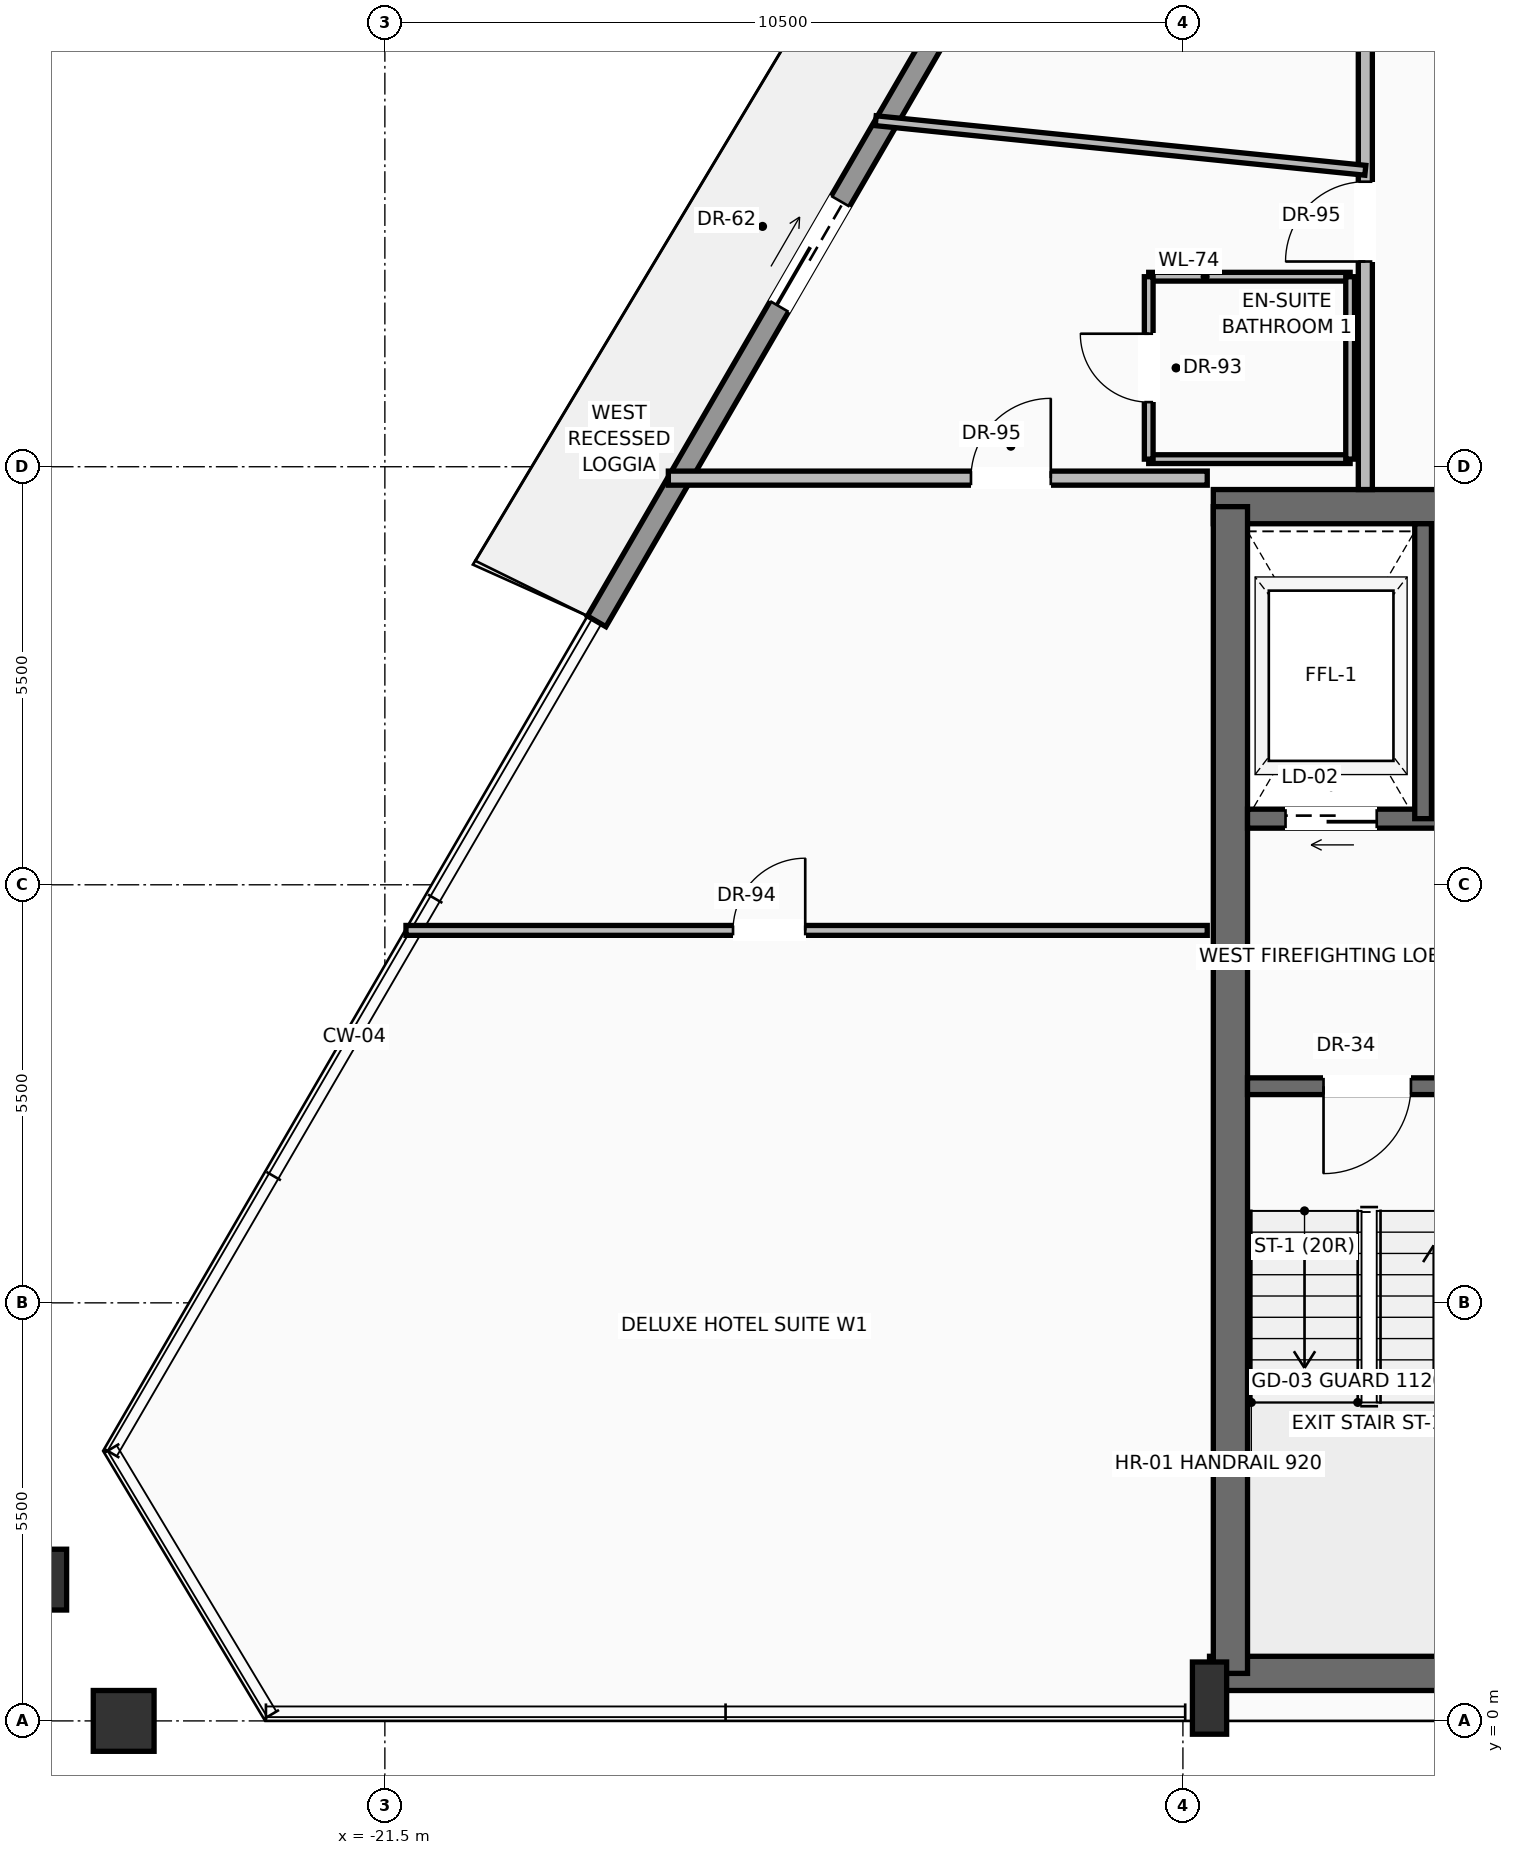
"""IFC4 building model, lengths in metres.
Left out: names, types, materials, properties, quantities, classifications, styles, units other than length and angle.
Written with IfcOpenShell. Run it as: python <this file> out.ifc"""

import sys

from ifc_helpers import new_model, si_unit, direction, frame, frame_2d, origin, origin_2d, place, context, subcontext, project, spatial, rectangle, hollow_rectangle, extrude, source, transform, mapped, element, fill, save


model = new_model("IFC4")
c1 = context("Model", 3, precision=1e-05, world=origin(), true_north=direction((0.0, 1.0)))
c2 = subcontext(c1, "Body", "Model", "MODEL_VIEW")
j1 = project(units=[si_unit("LENGTHUNIT", "METRE"), si_unit("PLANEANGLEUNIT", "RADIAN")], contexts=[c1])
p1 = place(None, origin())
s1 = spatial("IfcSite", under=j1, at=p1, CompositionType="ELEMENT")
p2 = place(p1, origin())
s2 = spatial("IfcBuilding", under=s1, at=p2, CompositionType="ELEMENT")
p3 = place(p2, frame((0.0, 0.0, 266.1)))
s3 = spatial("IfcBuildingStorey", under=s2, at=p3, CompositionType="ELEMENT", Elevation=266.1)
p4 = place(p3, frame((-10.65, 0.625, 0.0), z_axis=(0.0, 0.0, 1.0), x_axis=(1.0, 0.0, 0.0)))
e1 = element("IfcWall", 1, at=p4, inside=s3, PredefinedType="SHEAR", context=c2, shape_type="SweptSolid", body=[
    extrude(rectangle(XDim=21.3, YDim=0.45, at=frame_2d((10.65, 0.0))), origin(), (0.0, 0.0, 1.0), 3.24),
])
p5 = place(p3, frame((-10.6, 15.975, 0.0), z_axis=(0.0, 0.0, 1.0), x_axis=(1.0, 0.0, 0.0)))
e2 = element("IfcWall", 2, at=p5, inside=s3, PredefinedType="SHEAR", context=c2, shape_type="SweptSolid", body=[
    extrude(rectangle(XDim=21.2, YDim=0.45, at=frame_2d((10.6, 0.0))), origin(), (0.0, 0.0, 1.0), 3.24),
])
p6 = place(p5, frame((3.17, 0.0, 0.0)))
e3 = element("IfcOpeningElement", 3, at=p6, cuts=e2, PredefinedType="OPENING", context=c2, shape_type="SweptSolid", body=[
    extrude(rectangle(XDim=1.3, YDim=2.3, at=frame_2d((0.65, 1.15))), frame((0.0, 0.235, 0.0), z_axis=(0.0, -1.0, 0.0), x_axis=(1.0, 0.0, 0.0)), (0.0, 0.0, 1.0), 0.47),
])
p7 = place(p5, frame((9.6, 0.0, 0.0)))
e4 = element("IfcOpeningElement", 4, at=p7, cuts=e2, PredefinedType="OPENING", context=c2, shape_type="SweptSolid", body=[
    extrude(rectangle(XDim=2.0, YDim=2.4, at=frame_2d((1.0, 1.2))), frame((0.0, 0.235, 0.0), z_axis=(0.0, -1.0, 0.0), x_axis=(1.0, 0.0, 0.0)), (0.0, 0.0, 1.0), 0.47),
])
p8 = place(p3, frame((-10.375, 0.625, 0.0), z_axis=(0.0, 0.0, 1.0), x_axis=(0.0, 1.0, 0.0)))
e5 = element("IfcWall", 5, at=p8, inside=s3, PredefinedType="SHEAR", context=c2, shape_type="SweptSolid", body=[
    extrude(rectangle(XDim=15.35, YDim=0.45, at=frame_2d((7.675, 0.0))), origin(), (0.0, 0.0, 1.0), 3.24),
])
m1 = source(origin(), c2, "Body", "SweptSolid", [
    extrude(rectangle(XDim=0.45, YDim=0.95, at=origin_2d()), origin(), (0.0, 0.0, 1.0), 3.45),
])
p9 = place(p3, frame((-10.65, 0.3, 0.0), z_axis=(0.0, 0.0, 1.0), x_axis=(1.0, 0.0, 0.0)))
e6 = element("IfcColumn", 6, at=p9, inside=s3, PredefinedType="PILASTER", context=c2, shape_type="MappedRepresentation", body=[
    mapped(m1, transform((0.0, 0.0, 0.0), scale=1.0)),
])
m2 = source(origin(), c2, "Body", "SweptSolid", [
    extrude(hollow_rectangle(XDim=0.8, YDim=0.8, WallThickness=0.04, at=origin_2d()), origin(), (0.0, 0.0, 1.0), 3.441),
])
p10 = place(p3, frame((-24.937, 0.0, 0.004), z_axis=(7.0947144e-05, 0.0, 0.999999997483), x_axis=(1.0, 0.0, 0.0)))
e7 = element("IfcColumn", 7, at=p10, inside=s3, PredefinedType="COLUMN", context=c2, shape_type="MappedRepresentation", body=[
    mapped(m2, transform((0.0, 0.0, 0.0), scale=1.0)),
])
m3 = source(origin(), c2, "Body", "SweptSolid", [
    extrude(hollow_rectangle(XDim=0.8, YDim=0.8, WallThickness=0.04, at=origin_2d()), origin(), (0.0, 0.0, 1.0), 3.442),
])
p11 = place(p3, frame((-26.087, 1.859, 0.004), z_axis=(0.011632927657, -0.016669134143, 0.999793386136), x_axis=(0.820050783097, 0.572290759267, 0.0)))
e8 = element("IfcColumn", 8, at=p11, inside=s3, PredefinedType="COLUMN", context=c2, shape_type="MappedRepresentation", body=[
    mapped(m3, transform((0.0, 0.0, 0.0), scale=1.0)),
])
p12 = place(p3, frame((-18.713, 14.466, 0.0), z_axis=(0.0, 0.0, 1.0), x_axis=(0.501837095331, 0.864962155097, 0.0)))
e9 = element("IfcWall", 9, at=p12, inside=s3, PredefinedType="SOLIDWALL", context=c2, shape_type="SweptSolid", body=[
    extrude(rectangle(XDim=19.956, YDim=0.28, at=frame_2d((9.978, 0.0))), origin(), (0.0, 0.0, 1.0), 2.82),
])
p13 = place(p12, frame((4.789, 0.0, 0.0)))
e10 = element("IfcOpeningElement", 10, at=p13, cuts=e9, PredefinedType="OPENING", context=c2, shape_type="SweptSolid", body=[
    extrude(rectangle(XDim=1.6, YDim=2.35, at=frame_2d((0.8, 1.175))), frame((0.0, 0.15, 0.0), z_axis=(0.0, -1.0, 0.0), x_axis=(1.0, 0.0, 0.0)), (0.0, 0.0, 1.0), 0.3),
])
p14 = place(p12, frame((13.57, 0.0, 0.9)))
e11 = element("IfcOpeningElement", 11, at=p14, cuts=e9, PredefinedType="OPENING", context=c2, shape_type="SweptSolid", body=[
    extrude(rectangle(XDim=1.55, YDim=1.75, at=frame_2d((0.775, 0.875))), frame((0.0, 0.15, 0.0), z_axis=(0.0, -1.0, 0.0), x_axis=(1.0, 0.0, 0.0)), (0.0, 0.0, 1.0), 0.3),
])
p15 = place(p3, frame((-5.5, 8.35, 0.0), z_axis=(0.0, 0.0, 1.0), x_axis=(-1.0, 0.0, 0.0)))
e12 = element("IfcWall", 12, at=p15, inside=s3, PredefinedType="SOLIDWALL", context=c2, shape_type="SweptSolid", body=[
    extrude(rectangle(XDim=4.65, YDim=0.22, at=frame_2d((2.325, 0.0))), origin(), (0.0, 0.0, 1.0), 3.24),
])
p16 = place(p15, frame((2.5, 0.0, 0.0)))
e13 = element("IfcOpeningElement", 13, at=p16, cuts=e12, PredefinedType="OPENING", context=c2, shape_type="SweptSolid", body=[
    extrude(rectangle(XDim=1.15, YDim=2.2, at=frame_2d((0.575, 1.1))), frame((0.0, 0.12, 0.0), z_axis=(0.0, -1.0, 0.0), x_axis=(1.0, 0.0, 0.0)), (0.0, 0.0, 1.0), 0.24),
])
p17 = place(p3, frame((-5.5, 11.87, 0.0), z_axis=(0.0, 0.0, 1.0), x_axis=(-1.0, 0.0, 0.0)))
e14 = element("IfcWall", 14, at=p17, inside=s3, PredefinedType="SOLIDWALL", context=c2, shape_type="SweptSolid", body=[
    extrude(rectangle(XDim=4.65, YDim=0.25, at=frame_2d((2.325, 0.0))), origin(), (0.0, 0.0, 1.0), 3.24),
])
p18 = place(p17, frame((2.95, 0.0, 0.0)))
e15 = element("IfcOpeningElement", 15, at=p18, cuts=e14, PredefinedType="OPENING", context=c2, shape_type="SweptSolid", body=[
    extrude(rectangle(XDim=1.2, YDim=2.25, at=frame_2d((0.6, 1.125))), frame((0.0, 0.135, 0.0), z_axis=(0.0, -1.0, 0.0), x_axis=(1.0, 0.0, 0.0)), (0.0, 0.0, 1.0), 0.27),
])
p19 = place(p3, frame((-7.84, 11.87, 0.0), z_axis=(0.0, 0.0, 1.0), x_axis=(0.0, 1.0, 0.0)))
e16 = element("IfcWall", 16, at=p19, inside=s3, PredefinedType="SOLIDWALL", context=c2, shape_type="SweptSolid", body=[
    extrude(rectangle(XDim=3.88, YDim=0.22, at=frame_2d((1.94, 0.0))), origin(), (0.0, 0.0, 1.0), 3.24),
])
p20 = place(p3, frame((-8.6, 16.2, 0.0), z_axis=(0.0, 0.0, 1.0), x_axis=(0.0, 1.0, 0.0)))
e17 = element("IfcWall", 17, at=p20, inside=s3, PredefinedType="PARTITIONING", context=c2, shape_type="SweptSolid", body=[
    extrude(rectangle(XDim=13.8, YDim=0.185, at=frame_2d((6.9, 0.0))), origin(), (0.0, 0.0, 1.0), 3.232),
])
p21 = place(p20, frame((3.0, 0.0, 0.0)))
e18 = element("IfcOpeningElement", 18, at=p21, cuts=e17, PredefinedType="OPENING", context=c2, shape_type="SweptSolid", body=[
    extrude(rectangle(XDim=1.05, YDim=2.25, at=frame_2d((0.525, 1.125))), frame((0.0, 0.103, 0.0), z_axis=(0.0, -1.0, 0.0), x_axis=(1.0, 0.0, 0.0)), (0.0, 0.0, 1.0), 0.205),
])
p22 = place(p20, frame((7.088, 0.0, 0.0)))
e19 = element("IfcOpeningElement", 19, at=p22, cuts=e17, PredefinedType="OPENING", context=c2, shape_type="SweptSolid", body=[
    extrude(rectangle(XDim=1.05, YDim=2.25, at=frame_2d((0.525, 1.125))), frame((0.0, 0.103, 0.0), z_axis=(0.0, -1.0, 0.0), x_axis=(1.0, 0.0, 0.0)), (0.0, 0.0, 1.0), 0.205),
])
p23 = place(p3, frame((-17.77, 16.35, 0.0), z_axis=(0.0, 0.0, 1.0), x_axis=(1.0, 0.0, 0.0)))
e20 = element("IfcWall", 20, at=p23, inside=s3, PredefinedType="PARTITIONING", context=c2, shape_type="SweptSolid", body=[
    extrude(rectangle(XDim=7.09, YDim=0.185, at=frame_2d((3.545, 0.0))), origin(), (0.0, 0.0, 1.0), 3.232),
])
p24 = place(p23, frame((3.982, 0.0, 0.0)))
e21 = element("IfcOpeningElement", 21, at=p24, cuts=e20, PredefinedType="OPENING", context=c2, shape_type="SweptSolid", body=[
    extrude(rectangle(XDim=1.05, YDim=2.25, at=frame_2d((0.525, 1.125))), frame((0.0, 0.103, 0.0), z_axis=(0.0, -1.0, 0.0), x_axis=(1.0, 0.0, 0.0)), (0.0, 0.0, 1.0), 0.205),
])
p25 = place(p3, frame((-21.222, 10.4, 0.0), z_axis=(0.0, 0.0, 1.0), x_axis=(1.0, 0.0, 0.0)))
e22 = element("IfcWall", 22, at=p25, inside=s3, PredefinedType="PARTITIONING", context=c2, shape_type="SweptSolid", body=[
    extrude(rectangle(XDim=10.542, YDim=0.13, at=frame_2d((5.271, 0.0))), origin(), (0.0, 0.0, 1.0), 3.232),
])
p26 = place(p25, frame((4.303, 0.0, 0.0)))
e23 = element("IfcOpeningElement", 23, at=p26, cuts=e22, PredefinedType="OPENING", context=c2, shape_type="SweptSolid", body=[
    extrude(rectangle(XDim=0.95, YDim=2.2, at=frame_2d((0.475, 1.1))), frame((0.0, 0.075, 0.0), z_axis=(0.0, -1.0, 0.0), x_axis=(1.0, 0.0, 0.0)), (0.0, 0.0, 1.0), 0.15),
])
for number, where, z_axis, x_axis in (
    (24, (-11.45, 16.6, 0.0), (0.0, 0.0, 1.0), (1.0, 0.0, 0.0)),
    (25, (-11.45, 19.0, 0.0), (0.0, 0.0, 1.0), (1.0, 0.0, 0.0)),
):
    element("IfcWall", number, at=place(p3, frame(where, z_axis=z_axis, x_axis=x_axis)), inside=s3, PredefinedType="PARTITIONING", context=c2, shape_type="SweptSolid", body=[
        extrude(rectangle(XDim=2.65, YDim=0.115, at=frame_2d((1.325, 0.0))), origin(), (0.0, 0.0, 1.0), 3.232),
    ])
p27 = place(p3, frame((-11.45, 16.6, 0.0), z_axis=(0.0, 0.0, 1.0), x_axis=(0.0, 1.0, 0.0)))
e26 = element("IfcWall", 26, at=p27, inside=s3, PredefinedType="PARTITIONING", context=c2, shape_type="SweptSolid", body=[
    extrude(rectangle(XDim=2.4, YDim=0.115, at=frame_2d((1.2, 0.0))), origin(), (0.0, 0.0, 1.0), 3.232),
])
p28 = place(p27, frame((0.75, 0.0, 0.0)))
e27 = element("IfcOpeningElement", 27, at=p28, cuts=e26, PredefinedType="OPENING", context=c2, shape_type="SweptSolid", body=[
    extrude(rectangle(XDim=0.9, YDim=2.15, at=frame_2d((0.45, 1.075))), frame((0.0, 0.067, 0.0), z_axis=(0.0, -1.0, 0.0), x_axis=(1.0, 0.0, 0.0)), (0.0, 0.0, 1.0), 0.135),
])
p29 = place(p3, frame((-8.8, 16.6, 0.0), z_axis=(0.0, 0.0, 1.0), x_axis=(0.0, 1.0, 0.0)))
e28 = element("IfcWall", 28, at=p29, inside=s3, PredefinedType="PARTITIONING", context=c2, shape_type="SweptSolid", body=[
    extrude(rectangle(XDim=2.4, YDim=0.115, at=frame_2d((1.2, 0.0))), origin(), (0.0, 0.0, 1.0), 3.232),
])
p30 = place(p3, frame((-15.042, 21.052, 0.0), z_axis=(0.0, 0.0, 1.0), x_axis=(0.994907937397, -0.100787876778, 0.0)))
e29 = element("IfcWall", 29, at=p30, inside=s3, PredefinedType="PARTITIONING", context=c2, shape_type="SweptSolid", body=[
    extrude(rectangle(XDim=6.475, YDim=0.13, at=frame_2d((3.237, 0.0))), origin(), (0.0, 0.0, 1.0), 3.232),
])
m4 = source(origin(), c2, "Body", "SweptSolid", [
    extrude(rectangle(XDim=1.6, YDim=2.35, at=frame_2d((0.8, 1.175))), frame((0.0, 0.025, 0.0), z_axis=(0.0, -1.0, 0.0), x_axis=(1.0, 0.0, 0.0)), (0.0, 0.0, 1.0), 0.05),
])
p31 = place(p13, origin())
e30 = element("IfcDoor", 30, at=p31, inside=s3, OperationType="SLIDING_TO_LEFT", PredefinedType="DOOR", context=c2, shape_type="MappedRepresentation", body=[
    mapped(m4, transform((0.0, 0.0, 0.0), scale=1.0)),
])
fill(e10, e30)
m5 = source(origin(), c2, "Body", "SweptSolid", [
    extrude(rectangle(XDim=1.15, YDim=2.2, at=frame_2d((0.575, 1.1))), frame((0.0, 0.025, 0.0), z_axis=(0.0, -1.0, 0.0), x_axis=(1.0, 0.0, 0.0)), (0.0, 0.0, 1.0), 0.05),
])
p32 = place(p16, origin())
e31 = element("IfcDoor", 31, at=p32, inside=s3, OperationType="SINGLE_SWING_RIGHT", PredefinedType="DOOR", context=c2, shape_type="MappedRepresentation", body=[
    mapped(m5, transform((0.0, 0.0, 0.0), scale=1.0)),
])
fill(e13, e31)
m6 = source(origin(), c2, "Body", "SweptSolid", [
    extrude(rectangle(XDim=1.2, YDim=2.25, at=frame_2d((0.6, 1.125))), frame((0.0, 0.025, 0.0), z_axis=(0.0, -1.0, 0.0), x_axis=(1.0, 0.0, 0.0)), (0.0, 0.0, 1.0), 0.05),
])
p33 = place(p18, origin())
e32 = element("IfcDoor", 32, at=p33, inside=s3, OperationType="SLIDING_TO_LEFT", PredefinedType="DOOR", context=c2, shape_type="MappedRepresentation", body=[
    mapped(m6, transform((0.0, 0.0, 0.0), scale=1.0)),
])
fill(e15, e32)
m7 = source(origin(), c2, "Body", "SweptSolid", [
    extrude(rectangle(XDim=1.05, YDim=2.25, at=frame_2d((0.525, 1.125))), frame((0.0, 0.025, 0.0), z_axis=(0.0, -1.0, 0.0), x_axis=(1.0, 0.0, 0.0)), (0.0, 0.0, 1.0), 0.05),
])
p34 = place(p24, origin())
e33 = element("IfcDoor", 33, at=p34, inside=s3, OperationType="SINGLE_SWING_RIGHT", PredefinedType="DOOR", context=c2, shape_type="MappedRepresentation", body=[
    mapped(m7, transform((0.0, 0.0, 0.0), scale=1.0)),
])
fill(e21, e33)
m8 = source(origin(), c2, "Body", "SweptSolid", [
    extrude(rectangle(XDim=0.95, YDim=2.2, at=frame_2d((0.475, 1.1))), frame((0.0, 0.025, 0.0), z_axis=(0.0, -1.0, 0.0), x_axis=(1.0, 0.0, 0.0)), (0.0, 0.0, 1.0), 0.05),
])
p35 = place(p26, origin())
e34 = element("IfcDoor", 34, at=p35, inside=s3, OperationType="SINGLE_SWING_RIGHT", PredefinedType="DOOR", context=c2, shape_type="MappedRepresentation", body=[
    mapped(m8, transform((0.0, 0.0, 0.0), scale=1.0)),
])
fill(e23, e34)
p36 = place(p21, origin())
e35 = element("IfcDoor", 35, at=p36, inside=s3, OperationType="SINGLE_SWING_LEFT", PredefinedType="DOOR", context=c2, shape_type="MappedRepresentation", body=[
    mapped(m7, transform((0.0, 0.0, 0.0), scale=1.0)),
])
fill(e18, e35)
m9 = source(origin(), c2, "Body", "SweptSolid", [
    extrude(rectangle(XDim=0.9, YDim=2.15, at=frame_2d((0.45, 1.075))), frame((0.0, 0.025, 0.0), z_axis=(0.0, -1.0, 0.0), x_axis=(1.0, 0.0, 0.0)), (0.0, 0.0, 1.0), 0.05),
])
p37 = place(p28, origin())
e36 = element("IfcDoor", 36, at=p37, inside=s3, OperationType="SINGLE_SWING_RIGHT", PredefinedType="DOOR", context=c2, shape_type="MappedRepresentation", body=[
    mapped(m9, transform((0.0, 0.0, 0.0), scale=1.0)),
])
fill(e27, e36)
save(model, sys.argv[1])
